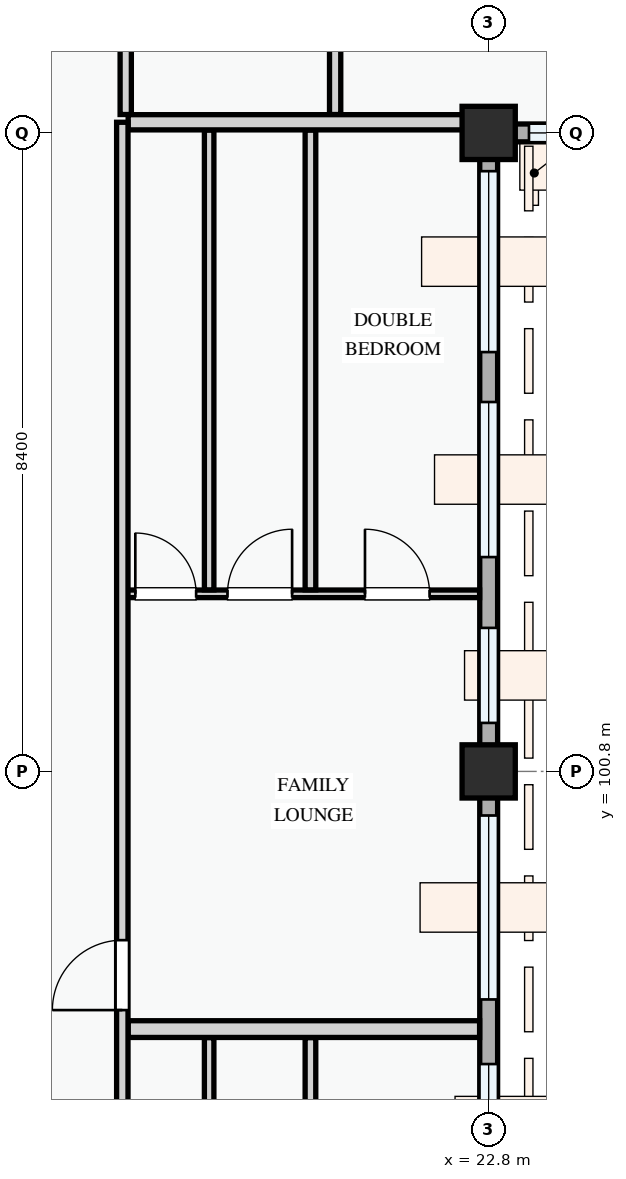
"""IFC4 building model, lengths in metres.
Left out: names, types, materials, properties, quantities, classifications, styles, units other than length and angle.
Written with IfcOpenShell. Run it as: python <this file> out.ifc"""

import sys

from ifc_helpers import new_model, si_unit, direction, frame, frame_2d, origin, origin_2d, place, context, subcontext, project, spatial, rectangle, extrude, element, fill, save


model = new_model("IFC4")
c1 = context("Model", 3, precision=1e-05, world=origin(), true_north=direction((0.0, 1.0)))
c2 = subcontext(c1, "Body", "Model", "MODEL_VIEW")
j1 = project(units=[si_unit("LENGTHUNIT", "METRE"), si_unit("PLANEANGLEUNIT", "RADIAN")], contexts=[c1])
p1 = place(None, origin())
s1 = spatial("IfcSite", under=j1, at=p1, CompositionType="ELEMENT")
p2 = place(p1, origin())
s2 = spatial("IfcBuilding", under=s1, at=p2, CompositionType="ELEMENT")
p3 = place(p2, frame((0.0, 0.0, 11.4)))
s3 = spatial("IfcBuildingStorey", under=s2, at=p3, CompositionType="ELEMENT", Elevation=11.4)
for number, where, z_axis, x_axis in (
    (1, (22.8, 100.8, 0.0), (0.0, 0.0, 1.0), (1.0, 0.0, 0.0)),
    (2, (22.8, 109.2, 0.0), (0.0, 0.0, 1.0), (1.0, 0.0, 0.0)),
):
    element("IfcColumn", number, at=place(p3, frame(where, z_axis=z_axis, x_axis=x_axis)), inside=s3, PredefinedType="COLUMN", context=c2, shape_type="SweptSolid", body=[
        extrude(rectangle(XDim=0.7, YDim=0.7, at=origin_2d()), origin(), (0.0, 0.0, 1.0), 3.3),
    ])
p4 = place(p3, frame((22.8, 109.2, 0.0), z_axis=(0.0, 0.0, 1.0), x_axis=(1.0, 0.0, 0.0)))
e3 = element("IfcWall", 3, at=p4, inside=s3, PredefinedType="STANDARD", context=c2, shape_type="SweptSolid", body=[
    extrude(rectangle(XDim=6.0, YDim=0.235, at=frame_2d((3.0, 0.0))), origin(), (0.0, 0.0, 1.0), 2.475),
])
p5 = place(p4, frame((0.53, 0.0, 0.78)))
e4 = element("IfcOpeningElement", 4, at=p5, cuts=e3, PredefinedType="OPENING", context=c2, shape_type="SweptSolid", body=[
    extrude(rectangle(XDim=1.48, YDim=1.52, at=frame_2d((0.74, 0.76))), frame((0.0, 0.127, 0.0), z_axis=(0.0, -1.0, 0.0), x_axis=(1.0, 0.0, 0.0)), (0.0, 0.0, 1.0), 0.255),
])
p6 = place(p4, frame((3.02, 0.0, 0.78)))
e5 = element("IfcOpeningElement", 5, at=p6, cuts=e3, PredefinedType="OPENING", context=c2, shape_type="SweptSolid", body=[
    extrude(rectangle(XDim=2.12, YDim=1.44, at=frame_2d((1.06, 0.72))), frame((0.0, 0.127, 0.0), z_axis=(0.0, -1.0, 0.0), x_axis=(1.0, 0.0, 0.0)), (0.0, 0.0, 1.0), 0.255),
])
p7 = place(p3, frame((22.8, 94.8, 0.0), z_axis=(0.0, 0.0, 1.0), x_axis=(0.0, 1.0, 0.0)))
e6 = element("IfcWall", 6, at=p7, inside=s3, PredefinedType="STANDARD", context=c2, shape_type="SweptSolid", body=[
    extrude(rectangle(XDim=6.0, YDim=0.235, at=frame_2d((3.0, 0.0))), origin(), (0.0, 0.0, 1.0), 2.575),
])
p8 = place(p7, frame((0.65, 0.0, 0.78)))
e7 = element("IfcOpeningElement", 7, at=p8, cuts=e6, PredefinedType="OPENING", context=c2, shape_type="SweptSolid", body=[
    extrude(rectangle(XDim=1.5, YDim=1.5, at=frame_2d((0.75, 0.75))), frame((0.0, 0.127, 0.0), z_axis=(0.0, -1.0, 0.0), x_axis=(1.0, 0.0, 0.0)), (0.0, 0.0, 1.0), 0.255),
])
p9 = place(p7, frame((3.0, 0.0, 0.78)))
e8 = element("IfcOpeningElement", 8, at=p9, cuts=e6, PredefinedType="OPENING", context=c2, shape_type="SweptSolid", body=[
    extrude(rectangle(XDim=2.42, YDim=1.52, at=frame_2d((1.21, 0.76))), frame((0.0, 0.127, 0.0), z_axis=(0.0, -1.0, 0.0), x_axis=(1.0, 0.0, 0.0)), (0.0, 0.0, 1.0), 0.255),
])
p10 = place(p3, frame((22.8, 100.8, 0.0), z_axis=(0.0, 0.0, 1.0), x_axis=(0.0, 1.0, 0.0)))
e9 = element("IfcWall", 9, at=p10, inside=s3, PredefinedType="STANDARD", context=c2, shape_type="SweptSolid", body=[
    extrude(rectangle(XDim=8.4, YDim=0.235, at=frame_2d((4.2, 0.0))), origin(), (0.0, 0.0, 1.0), 2.425),
])
p11 = place(p10, frame((0.638, 0.0, 0.78)))
e10 = element("IfcOpeningElement", 10, at=p11, cuts=e9, PredefinedType="OPENING", context=c2, shape_type="SweptSolid", body=[
    extrude(rectangle(XDim=1.25, YDim=1.3, at=frame_2d((0.625, 0.65))), frame((0.0, 0.127, 0.0), z_axis=(0.0, -1.0, 0.0), x_axis=(1.0, 0.0, 0.0)), (0.0, 0.0, 1.0), 0.255),
])
p12 = place(p10, frame((2.82, 0.0, 0.78)))
e11 = element("IfcOpeningElement", 11, at=p12, cuts=e9, PredefinedType="OPENING", context=c2, shape_type="SweptSolid", body=[
    extrude(rectangle(XDim=2.04, YDim=1.46, at=frame_2d((1.02, 0.73))), frame((0.0, 0.127, 0.0), z_axis=(0.0, -1.0, 0.0), x_axis=(1.0, 0.0, 0.0)), (0.0, 0.0, 1.0), 0.255),
])
p13 = place(p10, frame((5.517, 0.0, 0.78)))
e12 = element("IfcOpeningElement", 12, at=p13, cuts=e9, PredefinedType="OPENING", context=c2, shape_type="SweptSolid", body=[
    extrude(rectangle(XDim=2.38, YDim=1.48, at=frame_2d((1.19, 0.74))), frame((0.0, 0.127, 0.0), z_axis=(0.0, -1.0, 0.0), x_axis=(1.0, 0.0, 0.0)), (0.0, 0.0, 1.0), 0.255),
])
for number, where, z_axis, x_axis in (
    (13, (18.025, 113.324, 0.0), (0.0, 0.0, 1.0), (0.0, -1.0, 0.0)),
    (14, (20.78, 113.324, 0.0), (0.0, 0.0, 1.0), (0.0, -1.0, 0.0)),
):
    element("IfcWall", number, at=place(p3, frame(where, z_axis=z_axis, x_axis=x_axis)), inside=s3, PredefinedType="PARTITIONING", context=c2, shape_type="SweptSolid", body=[
        extrude(rectangle(XDim=3.882, YDim=0.148, at=frame_2d((1.941, 0.0))), origin(), (0.0, 0.0, 1.0), 3.0),
    ])
p14 = place(p3, frame((20.455, 90.822, 0.0), z_axis=(0.0, 0.0, 1.0), x_axis=(0.0, 1.0, 0.0)))
e15 = element("IfcWall", 15, at=p14, inside=s3, PredefinedType="PARTITIONING", context=c2, shape_type="SweptSolid", body=[
    extrude(rectangle(XDim=6.477, YDim=0.14, at=frame_2d((3.238, 0.0))), origin(), (0.0, 0.0, 1.0), 3.0),
])
p15 = place(p3, frame((19.122, 90.822, 0.0), z_axis=(0.0, 0.0, 1.0), x_axis=(0.0, 1.0, 0.0)))
e16 = element("IfcWall", 16, at=p15, inside=s3, PredefinedType="PARTITIONING", context=c2, shape_type="SweptSolid", body=[
    extrude(rectangle(XDim=6.477, YDim=0.125, at=frame_2d((3.238, 0.0))), origin(), (0.0, 0.0, 1.0), 3.0),
])
p16 = place(p3, frame((17.98, 103.136, 0.0), z_axis=(0.0, 0.0, 1.0), x_axis=(1.0, 0.0, 0.0)))
e17 = element("IfcWall", 17, at=p16, inside=s3, PredefinedType="PARTITIONING", context=c2, shape_type="SweptSolid", body=[
    extrude(rectangle(XDim=4.7, YDim=0.1, at=frame_2d((2.35, 0.0))), origin(), (0.0, 0.0, 1.0), 3.0),
])
p17 = place(p16, frame((0.171, 0.0, 0.0)))
e18 = element("IfcOpeningElement", 18, at=p17, cuts=e17, PredefinedType="OPENING", context=c2, shape_type="SweptSolid", body=[
    extrude(rectangle(XDim=0.8, YDim=2.1, at=frame_2d((0.4, 1.05))), frame((0.0, 0.06, 0.0), z_axis=(0.0, -1.0, 0.0), x_axis=(1.0, 0.0, 0.0)), (0.0, 0.0, 1.0), 0.12),
])
p18 = place(p16, frame((1.384, 0.0, 0.0)))
e19 = element("IfcOpeningElement", 19, at=p18, cuts=e17, PredefinedType="OPENING", context=c2, shape_type="SweptSolid", body=[
    extrude(rectangle(XDim=0.85, YDim=2.1, at=frame_2d((0.425, 1.05))), frame((0.0, 0.06, 0.0), z_axis=(0.0, -1.0, 0.0), x_axis=(1.0, 0.0, 0.0)), (0.0, 0.0, 1.0), 0.12),
])
p19 = place(p16, frame((3.193, 0.0, 0.0)))
e20 = element("IfcOpeningElement", 20, at=p19, cuts=e17, PredefinedType="OPENING", context=c2, shape_type="SweptSolid", body=[
    extrude(rectangle(XDim=0.85, YDim=2.1, at=frame_2d((0.425, 1.05))), frame((0.0, 0.06, 0.0), z_axis=(0.0, -1.0, 0.0), x_axis=(1.0, 0.0, 0.0)), (0.0, 0.0, 1.0), 0.12),
])
p20 = place(p3, frame((20.455, 103.188, 0.0), z_axis=(0.0, 0.0, 1.0), x_axis=(0.0, 1.0, 0.0)))
e21 = element("IfcWall", 21, at=p20, inside=s3, PredefinedType="PARTITIONING", context=c2, shape_type="SweptSolid", body=[
    extrude(rectangle(XDim=6.05, YDim=0.14, at=frame_2d((3.025, 0.0))), origin(), (0.0, 0.0, 1.0), 3.0),
])
p21 = place(p3, frame((19.122, 103.188, 0.0), z_axis=(0.0, 0.0, 1.0), x_axis=(0.0, 1.0, 0.0)))
e22 = element("IfcWall", 22, at=p21, inside=s3, PredefinedType="PARTITIONING", context=c2, shape_type="SweptSolid", body=[
    extrude(rectangle(XDim=6.05, YDim=0.125, at=frame_2d((3.025, 0.0))), origin(), (0.0, 0.0, 1.0), 3.0),
])
p22 = place(p3, frame((18.057, 97.41, 0.0), z_axis=(0.0, 0.0, 1.0), x_axis=(1.0, 0.0, 0.0)))
e23 = element("IfcWall", 23, at=p22, inside=s3, PredefinedType="PARTITIONING", context=c2, shape_type="SweptSolid", body=[
    extrude(rectangle(XDim=4.624, YDim=0.22, at=frame_2d((2.312, 0.0))), origin(), (0.0, 0.0, 1.0), 3.0),
])
p23 = place(p3, frame((18.057, 109.34, 0.0), z_axis=(0.0, 0.0, 1.0), x_axis=(1.0, 0.0, 0.0)))
e24 = element("IfcWall", 24, at=p23, inside=s3, PredefinedType="PARTITIONING", context=c2, shape_type="SweptSolid", body=[
    extrude(rectangle(XDim=4.683, YDim=0.2, at=frame_2d((2.342, 0.0))), origin(), (0.0, 0.0, 1.0), 2.375),
])
p24 = place(p3, frame((17.98, 72.06, 0.0), z_axis=(0.0, 0.0, 1.0), x_axis=(0.0, 1.0, 0.0)))
e25 = element("IfcWall", 25, at=p24, inside=s3, PredefinedType="PARTITIONING", context=c2, shape_type="SweptSolid", body=[
    extrude(rectangle(XDim=37.28, YDim=0.15, at=frame_2d((18.64, 0.0))), origin(), (0.0, 0.0, 1.0), 3.0),
])
p25 = place(p24, frame((3.684, 0.0, 0.0)))
e26 = element("IfcOpeningElement", 26, at=p25, cuts=e25, PredefinedType="OPENING", context=c2, shape_type="SweptSolid", body=[
    extrude(rectangle(XDim=0.92, YDim=2.1, at=frame_2d((0.46, 1.05))), frame((0.0, 0.085, 0.0), z_axis=(0.0, -1.0, 0.0), x_axis=(1.0, 0.0, 0.0)), (0.0, 0.0, 1.0), 0.17),
])
p26 = place(p24, frame((17.5, 0.0, 0.0)))
e27 = element("IfcOpeningElement", 27, at=p26, cuts=e25, PredefinedType="OPENING", context=c2, shape_type="SweptSolid", body=[
    extrude(rectangle(XDim=0.92, YDim=2.1, at=frame_2d((0.46, 1.05))), frame((0.0, 0.085, 0.0), z_axis=(0.0, -1.0, 0.0), x_axis=(1.0, 0.0, 0.0)), (0.0, 0.0, 1.0), 0.17),
])
p27 = place(p24, frame((25.6, 0.0, 0.0)))
e28 = element("IfcOpeningElement", 28, at=p27, cuts=e25, PredefinedType="OPENING", context=c2, shape_type="SweptSolid", body=[
    extrude(rectangle(XDim=0.92, YDim=2.1, at=frame_2d((0.46, 1.05))), frame((0.0, 0.085, 0.0), z_axis=(0.0, -1.0, 0.0), x_axis=(1.0, 0.0, 0.0)), (0.0, 0.0, 1.0), 0.17),
])
p28 = place(p5, origin())
e29 = element("IfcWindow", 29, at=p28, inside=s3, PartitioningType="SINGLE_PANEL", PredefinedType="WINDOW", context=c2, shape_type="SweptSolid", body=[
    extrude(rectangle(XDim=1.48, YDim=1.52, at=frame_2d((0.74, 0.76))), frame((0.0, 0.03, 0.0), z_axis=(0.0, -1.0, 0.0), x_axis=(1.0, 0.0, 0.0)), (0.0, 0.0, 1.0), 0.06),
])
fill(e4, e29)
p29 = place(p8, origin())
e30 = element("IfcWindow", 30, at=p29, inside=s3, PartitioningType="SINGLE_PANEL", PredefinedType="WINDOW", context=c2, shape_type="SweptSolid", body=[
    extrude(rectangle(XDim=1.5, YDim=1.5, at=frame_2d((0.75, 0.75))), frame((0.0, 0.03, 0.0), z_axis=(0.0, -1.0, 0.0), x_axis=(1.0, 0.0, 0.0)), (0.0, 0.0, 1.0), 0.06),
])
fill(e7, e30)
p30 = place(p9, origin())
e31 = element("IfcWindow", 31, at=p30, inside=s3, PartitioningType="DOUBLE_PANEL_VERTICAL", PredefinedType="WINDOW", context=c2, shape_type="SweptSolid", body=[
    extrude(rectangle(XDim=2.42, YDim=1.52, at=frame_2d((1.21, 0.76))), frame((0.0, 0.03, 0.0), z_axis=(0.0, -1.0, 0.0), x_axis=(1.0, 0.0, 0.0)), (0.0, 0.0, 1.0), 0.06),
])
fill(e8, e31)
p31 = place(p11, origin())
e32 = element("IfcWindow", 32, at=p31, inside=s3, PartitioningType="SINGLE_PANEL", PredefinedType="WINDOW", context=c2, shape_type="SweptSolid", body=[
    extrude(rectangle(XDim=1.25, YDim=1.3, at=frame_2d((0.625, 0.65))), frame((0.0, 0.03, 0.0), z_axis=(0.0, -1.0, 0.0), x_axis=(1.0, 0.0, 0.0)), (0.0, 0.0, 1.0), 0.06),
])
fill(e10, e32)
p32 = place(p12, origin())
e33 = element("IfcWindow", 33, at=p32, inside=s3, PartitioningType="DOUBLE_PANEL_VERTICAL", PredefinedType="WINDOW", context=c2, shape_type="SweptSolid", body=[
    extrude(rectangle(XDim=2.04, YDim=1.46, at=frame_2d((1.02, 0.73))), frame((0.0, 0.03, 0.0), z_axis=(0.0, -1.0, 0.0), x_axis=(1.0, 0.0, 0.0)), (0.0, 0.0, 1.0), 0.06),
])
fill(e11, e33)
p33 = place(p13, origin())
e34 = element("IfcWindow", 34, at=p33, inside=s3, PartitioningType="DOUBLE_PANEL_VERTICAL", PredefinedType="WINDOW", context=c2, shape_type="SweptSolid", body=[
    extrude(rectangle(XDim=2.38, YDim=1.48, at=frame_2d((1.19, 0.74))), frame((0.0, 0.03, 0.0), z_axis=(0.0, -1.0, 0.0), x_axis=(1.0, 0.0, 0.0)), (0.0, 0.0, 1.0), 0.06),
])
fill(e12, e34)
p34 = place(p17, origin())
e35 = element("IfcDoor", 35, at=p34, inside=s3, OperationType="SINGLE_SWING_LEFT", PredefinedType="DOOR", context=c2, shape_type="SweptSolid", body=[
    extrude(rectangle(XDim=0.8, YDim=2.1, at=frame_2d((0.4, 1.05))), frame((0.0, 0.025, 0.0), z_axis=(0.0, -1.0, 0.0), x_axis=(1.0, 0.0, 0.0)), (0.0, 0.0, 1.0), 0.05),
])
fill(e18, e35)
p35 = place(p18, origin())
e36 = element("IfcDoor", 36, at=p35, inside=s3, OperationType="SINGLE_SWING_RIGHT", PredefinedType="DOOR", context=c2, shape_type="SweptSolid", body=[
    extrude(rectangle(XDim=0.85, YDim=2.1, at=frame_2d((0.425, 1.05))), frame((0.0, 0.025, 0.0), z_axis=(0.0, -1.0, 0.0), x_axis=(1.0, 0.0, 0.0)), (0.0, 0.0, 1.0), 0.05),
])
fill(e19, e36)
p36 = place(p19, origin())
e37 = element("IfcDoor", 37, at=p36, inside=s3, OperationType="SINGLE_SWING_LEFT", PredefinedType="DOOR", context=c2, shape_type="SweptSolid", body=[
    extrude(rectangle(XDim=0.85, YDim=2.1, at=frame_2d((0.425, 1.05))), frame((0.0, 0.025, 0.0), z_axis=(0.0, -1.0, 0.0), x_axis=(1.0, 0.0, 0.0)), (0.0, 0.0, 1.0), 0.05),
])
fill(e20, e37)
p37 = place(p27, origin())
e38 = element("IfcDoor", 38, at=p37, inside=s3, OperationType="SINGLE_SWING_LEFT", PredefinedType="DOOR", context=c2, shape_type="SweptSolid", body=[
    extrude(rectangle(XDim=0.92, YDim=2.1, at=frame_2d((0.46, 1.05))), frame((0.0, 0.025, 0.0), z_axis=(0.0, -1.0, 0.0), x_axis=(1.0, 0.0, 0.0)), (0.0, 0.0, 1.0), 0.05),
])
fill(e28, e38)
save(model, sys.argv[1])
